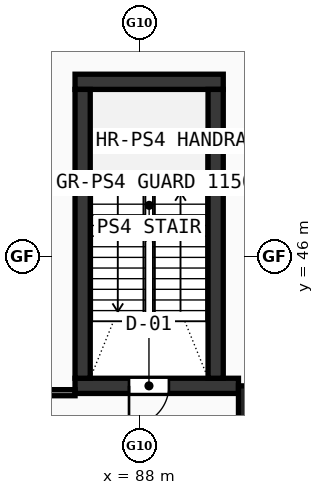
"""IFC4 building model, lengths in metres.
Left out: names, types, materials, properties, quantities, classifications, styles, units other than length and angle.
Written with IfcOpenShell. Run it as: python <this file> out.ifc"""

import sys

from ifc_helpers import new_model, si_unit, direction, frame, frame_2d, origin, origin_2d, place, context, subcontext, project, spatial, rectangle, hollow_rectangle, extrude, source, transform, mapped, element, fill, save


model = new_model("IFC4")
c1 = context("Model", 3, precision=1e-05, world=origin(), true_north=direction((0.0, 1.0)))
c2 = subcontext(c1, "Body", "Model", "MODEL_VIEW")
j1 = project(units=[si_unit("LENGTHUNIT", "METRE"), si_unit("PLANEANGLEUNIT", "RADIAN")], contexts=[c1])
p1 = place(None, origin())
s1 = spatial("IfcSite", under=j1, at=p1, CompositionType="ELEMENT")
p2 = place(p1, origin())
s2 = spatial("IfcBuilding", under=s1, at=p2, CompositionType="ELEMENT")
p3 = place(p2, frame((0.0, 0.0, -4.8)))
s3 = spatial("IfcBuildingStorey", under=s2, at=p3, CompositionType="ELEMENT", Elevation=-4.8)
p4 = place(p3, frame((86.3, 50.6, 0.0), z_axis=(0.0, 0.0, 1.0), x_axis=(1.0, 0.0, 0.0)))
e1 = element("IfcWall", 1, at=p4, inside=s3, PredefinedType="SHEAR", context=c2, shape_type="SweptSolid", body=[
    extrude(rectangle(XDim=3.9, YDim=0.4, at=frame_2d((1.95, 0.0))), origin(), (0.0, 0.0, 1.0), 4.52),
])
p5 = place(p3, frame((86.3, 42.6, 0.0), z_axis=(0.0, 0.0, 1.0), x_axis=(1.0, 0.0, 0.0)))
e2 = element("IfcWall", 2, at=p5, inside=s3, PredefinedType="SHEAR", context=c2, shape_type="SweptSolid", body=[
    extrude(rectangle(XDim=4.3, YDim=0.4, at=frame_2d((2.15, 0.0))), origin(), (0.0, 0.0, 1.0), 4.52),
])
p6 = place(p5, frame((1.42, 0.0, 0.0)))
e3 = element("IfcOpeningElement", 3, at=p6, cuts=e2, PredefinedType="OPENING", context=c2, shape_type="SweptSolid", body=[
    extrude(rectangle(XDim=1.05, YDim=2.1, at=frame_2d((0.525, 1.05))), frame((0.0, 0.21, 0.0), z_axis=(0.0, -1.0, 0.0), x_axis=(1.0, 0.0, 0.0)), (0.0, 0.0, 1.0), 0.42),
])
for number, where, z_axis, x_axis in (
    (4, (86.5, 42.8, 0.0), (0.0, 0.0, 1.0), (0.0, 1.0, 0.0)),
    (5, (90.0, 42.8, 0.0), (0.0, 0.0, 1.0), (0.0, 1.0, 0.0)),
):
    element("IfcWall", number, at=place(p3, frame(where, z_axis=z_axis, x_axis=x_axis)), inside=s3, PredefinedType="SHEAR", context=c2, shape_type="SweptSolid", body=[
        extrude(rectangle(XDim=7.6, YDim=0.4, at=frame_2d((3.8, 0.0))), origin(), (0.0, 0.0, 1.0), 4.52),
    ])
m1 = source(origin(), c2, "Body", "SweptSolid", [
    extrude(hollow_rectangle(XDim=1.2, YDim=1.2, WallThickness=0.05, at=origin_2d()), origin(), (0.0, 0.0, 1.0), 4.82),
])
p7 = place(p3, frame((91.2, 42.0, -0.3), z_axis=(0.0, 0.0, 1.0), x_axis=(1.0, 0.0, 0.0)))
e6 = element("IfcColumn", 6, at=p7, inside=s3, PredefinedType="COLUMN", context=c2, shape_type="MappedRepresentation", body=[
    mapped(m1, transform((0.0, 0.0, 0.0), scale=1.0)),
])
p8 = place(p3, frame((9.7, 42.42, 0.0), z_axis=(0.0, 0.0, 1.0), x_axis=(1.0, 0.0, 0.0)))
e7 = element("IfcWall", 7, at=p8, inside=s3, PredefinedType="PARTITIONING", context=c2, shape_type="SweptSolid", body=[
    extrude(rectangle(XDim=76.6, YDim=0.16, at=frame_2d((38.3, 0.0))), origin(), (0.0, 0.0, 1.0), 3.62),
])
p9 = place(p8, frame((26.8, 0.0, 0.0)))
e8 = element("IfcOpeningElement", 8, at=p9, cuts=e7, PredefinedType="OPENING", context=c2, shape_type="SweptSolid", body=[
    extrude(rectangle(XDim=1.05, YDim=2.1, at=frame_2d((0.525, 1.05))), frame((0.0, 0.09, 0.0), z_axis=(0.0, -1.0, 0.0), x_axis=(1.0, 0.0, 0.0)), (0.0, 0.0, 1.0), 0.18),
])
p10 = place(p8, frame((46.3, 0.0, 0.0)))
e9 = element("IfcOpeningElement", 9, at=p10, cuts=e7, PredefinedType="OPENING", context=c2, shape_type="SweptSolid", body=[
    extrude(rectangle(XDim=1.05, YDim=2.1, at=frame_2d((0.525, 1.05))), frame((0.0, 0.09, 0.0), z_axis=(0.0, -1.0, 0.0), x_axis=(1.0, 0.0, 0.0)), (0.0, 0.0, 1.0), 0.18),
])
m2 = source(origin(), c2, "Body", "SweptSolid", [
    extrude(rectangle(XDim=1.05, YDim=2.1, at=frame_2d((0.525, 1.05))), frame((0.0, 0.025, 0.0), z_axis=(0.0, -1.0, 0.0), x_axis=(1.0, 0.0, 0.0)), (0.0, 0.0, 1.0), 0.05),
])
p11 = place(p6, frame((1.05, 0.0, 0.0), z_axis=(0.0, 0.0, 1.0), x_axis=(-1.0, 0.0, 0.0)))
e10 = element("IfcDoor", 10, at=p11, inside=s3, OperationType="SINGLE_SWING_RIGHT", PredefinedType="DOOR", context=c2, shape_type="MappedRepresentation", body=[
    mapped(m2, transform((0.0, 0.0, 0.0), scale=1.0)),
])
fill(e3, e10)
save(model, sys.argv[1])
